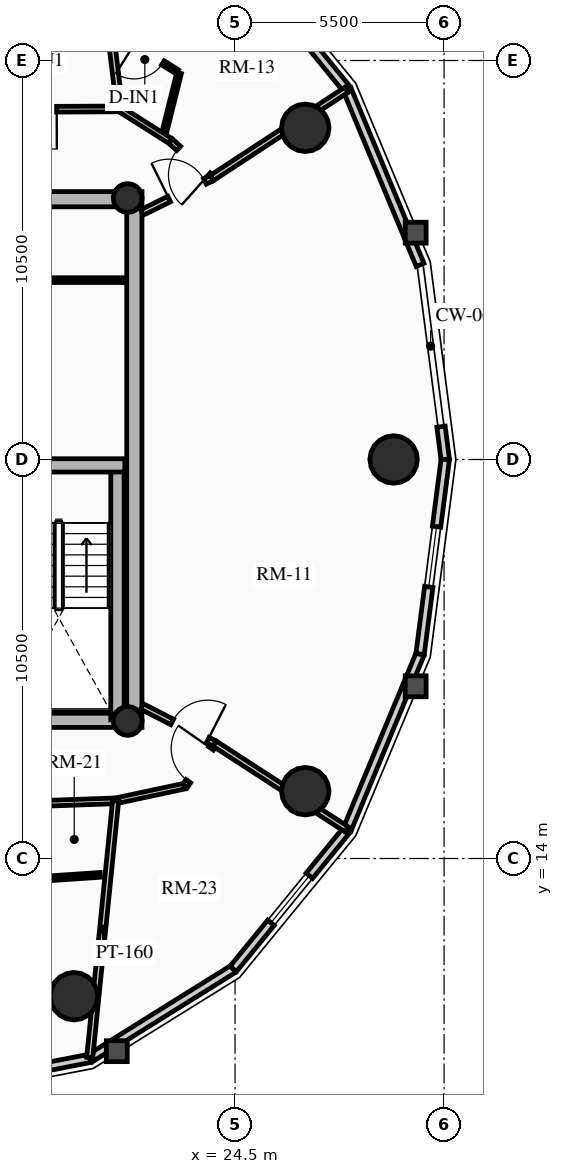
"""IFC4 building model, lengths in metres.
Left out: names, types, materials, properties, quantities, classifications, styles, units other than length and angle.
Written with IfcOpenShell. Run it as: python <this file> out.ifc"""

import sys

from ifc_helpers import new_model, si_unit, direction, frame, frame_2d, origin, origin_2d, place, context, subcontext, project, spatial, rectangle, circle, hollow_circle, extrude, source, transform, mapped, element, fill, save


model = new_model("IFC4")
c1 = context("Model", 3, precision=1e-05, world=origin(), true_north=direction((0.0, 1.0)))
c2 = subcontext(c1, "Body", "Model", "MODEL_VIEW")
j1 = project(units=[si_unit("LENGTHUNIT", "METRE"), si_unit("PLANEANGLEUNIT", "RADIAN")], contexts=[c1])
p1 = place(None, origin())
s1 = spatial("IfcSite", under=j1, at=p1, CompositionType="ELEMENT")
p2 = place(p1, origin())
s2 = spatial("IfcBuilding", under=s1, at=p2, CompositionType="ELEMENT")
p3 = place(p2, frame((0.0, 0.0, 183.61)))
s3 = spatial("IfcBuildingStorey", under=s2, at=p3, CompositionType="ELEMENT", Elevation=183.61)
p4 = place(p3, frame((21.85, 17.45, 0.0), z_axis=(0.0, 0.0, 1.0), x_axis=(0.0, 1.0, 0.0)))
e1 = element("IfcWall", 1, at=p4, inside=s3, PredefinedType="SHEAR", context=c2, shape_type="SweptSolid", body=[
    extrude(rectangle(XDim=14.1, YDim=0.4, at=frame_2d((7.05, 0.0))), origin(), (0.0, 0.0, 1.0), 2.91),
])
p5 = place(p3, frame((11.15, 17.65, 0.0), z_axis=(0.0, 0.0, 1.0), x_axis=(1.0, 0.0, 0.0)))
e2 = element("IfcWall", 2, at=p5, inside=s3, PredefinedType="SHEAR", context=c2, shape_type="SweptSolid", body=[
    extrude(rectangle(XDim=10.7, YDim=0.4, at=frame_2d((5.35, 0.0))), origin(), (0.0, 0.0, 1.0), 2.91),
])
m1 = source(origin(), c2, "Body", "SweptSolid", [
    extrude(rectangle(XDim=1.5, YDim=2.02, at=frame_2d((0.75, 1.01))), frame((0.0, 0.21, 0.0), z_axis=(0.0, -1.0, 0.0), x_axis=(1.0, 0.0, 0.0)), (0.0, 0.0, 1.0), 0.42),
])
p6 = place(p5, frame((5.45, 0.0, 0.0)))
e3 = element("IfcOpeningElement", 3, at=p6, cuts=e2, PredefinedType="OPENING", context=c2, shape_type="MappedRepresentation", body=[
    mapped(m1, transform((0.0, 0.0, 0.0), x_axis=(1.0, 0.0, 0.0), y_axis=(0.0, 1.0, 0.0), z_axis=(0.0, 0.0, 1.0), scale=1.0)),
])
p7 = place(p3, frame((11.15, 31.35, 0.0), z_axis=(0.0, 0.0, 1.0), x_axis=(1.0, 0.0, 0.0)))
e4 = element("IfcWall", 4, at=p7, inside=s3, PredefinedType="SHEAR", context=c2, shape_type="SweptSolid", body=[
    extrude(rectangle(XDim=10.7, YDim=0.4, at=frame_2d((5.35, 0.0))), origin(), (0.0, 0.0, 1.0), 2.91),
])
p8 = place(p7, frame((4.6, 0.0, 0.0)))
e5 = element("IfcOpeningElement", 5, at=p8, cuts=e4, PredefinedType="OPENING", context=c2, shape_type="MappedRepresentation", body=[
    mapped(m1, transform((0.0, 0.0, 0.0), x_axis=(1.0, 0.0, 0.0), y_axis=(0.0, 1.0, 0.0), z_axis=(0.0, 0.0, 1.0), scale=1.0)),
])
p9 = place(p3, frame((21.405, 17.65, 0.0), z_axis=(0.0, 0.0, 1.0), x_axis=(0.0, 1.0, 0.0)))
e6 = element("IfcWall", 6, at=p9, inside=s3, PredefinedType="SHEAR", context=c2, shape_type="SweptSolid", body=[
    extrude(rectangle(XDim=6.695, YDim=0.35, at=frame_2d((3.348, 0.0))), origin(), (0.0, 0.0, 1.0), 2.91),
])
p10 = place(p3, frame((18.315, 24.345, 0.0), z_axis=(0.0, 0.0, 1.0), x_axis=(1.0, 0.0, 0.0)))
e7 = element("IfcWall", 7, at=p10, inside=s3, PredefinedType="SHEAR", context=c2, shape_type="SweptSolid", body=[
    extrude(rectangle(XDim=3.285, YDim=0.35, at=frame_2d((1.643, 0.0))), origin(), (0.0, 0.0, 1.0), 2.91),
])
for number, where, z_axis, x_axis in (
    (8, (21.675, 17.62, 0.0), (0.0, 0.0, 1.0), (1.0, 0.0, 0.0)),
    (9, (21.675, 31.38, 0.0), (0.0, 0.0, 1.0), (1.0, 0.0, 0.0)),
):
    element("IfcColumn", number, at=place(p3, frame(where, z_axis=z_axis, x_axis=x_axis)), inside=s3, PredefinedType="COLUMN", context=c2, shape_type="SweptSolid", body=[
        extrude(hollow_circle(Radius=0.38, WallThickness=0.032, at=origin_2d()), origin(), (0.0, 0.0, 1.0), 2.91),
    ])
for number, where, z_axis, x_axis in (
    (10, (28.672, 24.5, 0.0), (0.0, 0.0, 1.0), (1.0, 0.0, 0.0)),
    (11, (26.347, 33.229, 0.0), (0.0, 0.0, 1.0), (1.0, 0.0, 0.0)),
    (12, (20.261, 10.377, 0.0), (0.0, 0.0, 1.0), (1.0, 0.0, 0.0)),
    (13, (26.347, 15.771, 0.0), (0.0, 0.0, 1.0), (1.0, 0.0, 0.0)),
):
    element("IfcColumn", number, at=place(p3, frame(where, z_axis=z_axis, x_axis=x_axis)), inside=s3, PredefinedType="USERDEFINED", context=c2, shape_type="SweptSolid", body=[
        extrude(circle(Radius=0.625, at=origin_2d()), origin(), (0.0, 0.0, 1.0), 2.91),
    ])
p11 = place(p3, frame((29.919, 25.363, 0.0), z_axis=(0.0, 0.0, 1.0), x_axis=(0.128247365719, -0.991742211054, 0.0)))
e14 = element("IfcWall", 14, at=p11, inside=s3, PredefinedType="SOLIDWALL", context=c2, shape_type="SweptSolid", body=[
    extrude(rectangle(XDim=0.87, YDim=0.22, at=frame_2d((0.435, 0.0))), origin(), (0.0, 0.0, 1.0), 2.675),
])
p12 = place(p3, frame((27.447, 34.24, 0.0), z_axis=(0.0, 0.0, 1.0), x_axis=(0.384144094086, -0.923273152961, 0.0)))
e15 = element("IfcWall", 15, at=p12, inside=s3, PredefinedType="SOLIDWALL", context=c2, shape_type="SweptSolid", body=[
    extrude(rectangle(XDim=5.003, YDim=0.22, at=frame_2d((2.501, 0.0))), origin(), (0.0, 0.0, 1.0), 2.245),
])
p13 = place(p3, frame((24.453, 37.906, 0.0), z_axis=(0.0, 0.0, 1.0), x_axis=(0.632470615287, -0.774584353572, 0.0)))
e16 = element("IfcWall", 16, at=p13, inside=s3, PredefinedType="SOLIDWALL", context=c2, shape_type="SweptSolid", body=[
    extrude(rectangle(XDim=4.733, YDim=0.22, at=frame_2d((2.366, 0.0))), origin(), (0.0, 0.0, 1.0), 2.245),
])
m2 = source(origin(), c2, "Body", "SweptSolid", [
    extrude(rectangle(XDim=1.6, YDim=1.3, at=frame_2d((0.8, 0.65))), frame((0.0, 0.12, 0.0), z_axis=(0.0, -1.0, 0.0), x_axis=(1.0, 0.0, 0.0)), (0.0, 0.0, 1.0), 0.24),
])
p14 = place(p13, frame((1.566, 0.0, 0.65)))
e17 = element("IfcOpeningElement", 17, at=p14, cuts=e16, PredefinedType="OPENING", context=c2, shape_type="MappedRepresentation", body=[
    mapped(m2, transform((0.0, 0.0, 0.0), x_axis=(1.0, 0.0, 0.0), y_axis=(0.0, 1.0, 0.0), z_axis=(0.0, 0.0, 1.0), scale=1.0)),
])
p15 = place(p3, frame((20.681, 8.741, 0.0), z_axis=(0.0, 0.0, 1.0), x_axis=(-0.981703883443, -0.190413983815, 0.0)))
e18 = element("IfcWall", 18, at=p15, inside=s3, PredefinedType="SOLIDWALL", context=c2, shape_type="SweptSolid", body=[
    extrude(rectangle(XDim=4.259, YDim=0.22, at=frame_2d((2.13, 0.0))), origin(), (0.0, 0.0, 1.0), 2.245),
])
p16 = place(p15, frame((1.33, 0.0, 0.65)))
e19 = element("IfcOpeningElement", 19, at=p16, cuts=e18, PredefinedType="OPENING", context=c2, shape_type="MappedRepresentation", body=[
    mapped(m2, transform((0.0, 0.0, 0.0), x_axis=(1.0, 0.0, 0.0), y_axis=(0.0, 1.0, 0.0), z_axis=(0.0, 0.0, 1.0), scale=1.0)),
])
p17 = place(p3, frame((24.453, 11.094, 0.0), z_axis=(0.0, 0.0, 1.0), x_axis=(-0.848399108042, -0.529357113368, 0.0)))
e20 = element("IfcWall", 20, at=p17, inside=s3, PredefinedType="SOLIDWALL", context=c2, shape_type="SweptSolid", body=[
    extrude(rectangle(XDim=4.446, YDim=0.22, at=frame_2d((2.223, 0.0))), origin(), (0.0, 0.0, 1.0), 2.245),
])
p18 = place(p3, frame((27.447, 14.76, 0.0), z_axis=(0.0, 0.0, 1.0), x_axis=(-0.632470615287, -0.774584353572, 0.0)))
e21 = element("IfcWall", 21, at=p18, inside=s3, PredefinedType="SOLIDWALL", context=c2, shape_type="SweptSolid", body=[
    extrude(rectangle(XDim=4.733, YDim=0.22, at=frame_2d((2.366, 0.0))), origin(), (0.0, 0.0, 1.0), 2.245),
])
p19 = place(p18, frame((1.566, 0.0, 0.65)))
e22 = element("IfcOpeningElement", 22, at=p19, cuts=e21, PredefinedType="OPENING", context=c2, shape_type="MappedRepresentation", body=[
    mapped(m2, transform((0.0, 0.0, 0.0), x_axis=(1.0, 0.0, 0.0), y_axis=(0.0, 1.0, 0.0), z_axis=(0.0, 0.0, 1.0), scale=1.0)),
])
p20 = place(p3, frame((29.369, 19.38, 0.0), z_axis=(0.0, 0.0, 1.0), x_axis=(-0.384144094086, -0.923273152961, 0.0)))
e23 = element("IfcWall", 23, at=p20, inside=s3, PredefinedType="SOLIDWALL", context=c2, shape_type="SweptSolid", body=[
    extrude(rectangle(XDim=5.003, YDim=0.22, at=frame_2d((2.501, 0.0))), origin(), (0.0, 0.0, 1.0), 2.245),
])
p21 = place(p3, frame((30.031, 24.5, 0.0), z_axis=(0.0, 0.0, 1.0), x_axis=(-0.128287912609, -0.991736966881, 0.0)))
e24 = element("IfcWall", 24, at=p21, inside=s3, PredefinedType="SOLIDWALL", context=c2, shape_type="SweptSolid", body=[
    extrude(rectangle(XDim=5.163, YDim=0.22, at=frame_2d((2.582, 0.0))), origin(), (0.0, 0.0, 1.0), 2.245),
])
p22 = place(p21, frame((1.782, 0.0, 0.65)))
e25 = element("IfcOpeningElement", 25, at=p22, cuts=e24, PredefinedType="OPENING", context=c2, shape_type="MappedRepresentation", body=[
    mapped(m2, transform((0.0, 0.0, 0.0), x_axis=(1.0, 0.0, 0.0), y_axis=(0.0, 1.0, 0.0), z_axis=(0.0, 0.0, 1.0), scale=1.0)),
])
p23 = place(p3, frame((18.38, 29.22, 0.0), z_axis=(0.0, 0.0, 1.0), x_axis=(1.0, 0.0, 0.0)))
e26 = element("IfcWall", 26, at=p23, inside=s3, PredefinedType="PARTITIONING", context=c2, shape_type="SweptSolid", body=[
    extrude(rectangle(XDim=3.22, YDim=0.125, at=frame_2d((1.61, 0.0))), origin(), (0.0, 0.0, 1.0), 2.212),
])
p24 = place(p3, frame((23.887, 31.906, 0.0), z_axis=(0.0, 0.0, 1.0), x_axis=(-0.744900957214, 0.66717506244, 0.0)))
e27 = element("IfcWall", 27, at=p24, inside=s3, PredefinedType="PARTITIONING", context=c2, shape_type="SweptSolid", body=[
    extrude(rectangle(XDim=1.464, YDim=0.15, at=frame_2d((0.732, 0.0))), origin(), (0.0, 0.0, 1.0), 2.245),
])
m3 = source(origin(), c2, "Body", "SweptSolid", [
    extrude(rectangle(XDim=1.05, YDim=2.015, at=frame_2d((0.525, 1.007))), frame((0.0, 0.085, 0.0), z_axis=(0.0, -1.0, 0.0), x_axis=(1.0, 0.0, 0.0)), (0.0, 0.0, 1.0), 0.17),
])
p25 = place(p24, frame((0.12, 0.0, 0.0)))
e28 = element("IfcOpeningElement", 28, at=p25, cuts=e27, PredefinedType="OPENING", context=c2, shape_type="MappedRepresentation", body=[
    mapped(m3, transform((0.0, 0.0, 0.0), x_axis=(1.0, 0.0, 0.0), y_axis=(0.0, 1.0, 0.0), z_axis=(0.0, 0.0, 1.0), scale=1.0)),
])
p26 = place(p3, frame((22.797, 32.883, 0.0), z_axis=(0.0, 0.0, 1.0), x_axis=(-0.84484009232, 0.535018895375, 0.0)))
e29 = element("IfcWall", 29, at=p26, inside=s3, PredefinedType="PARTITIONING", context=c2, shape_type="SweptSolid", body=[
    extrude(rectangle(XDim=1.575, YDim=0.15, at=frame_2d((0.788, 0.0))), origin(), (0.0, 0.0, 1.0), 2.245),
])
p27 = place(p3, frame((21.466, 33.726, 0.0), z_axis=(0.0, 0.0, 1.0), x_axis=(-0.99998838579, -0.004819573058, 0.0)))
e30 = element("IfcWall", 30, at=p27, inside=s3, PredefinedType="PARTITIONING", context=c2, shape_type="SweptSolid", body=[
    extrude(rectangle(XDim=3.343, YDim=0.15, at=frame_2d((1.672, 0.0))), origin(), (0.0, 0.0, 1.0), 2.245),
])
p28 = place(p27, frame((1.66, 0.0, 0.0)))
e31 = element("IfcOpeningElement", 31, at=p28, cuts=e30, PredefinedType="OPENING", context=c2, shape_type="MappedRepresentation", body=[
    mapped(m3, transform((0.0, 0.0, 0.0), x_axis=(1.0, 0.0, 0.0), y_axis=(0.0, 1.0, 0.0), z_axis=(0.0, 0.0, 1.0), scale=1.0)),
])
p29 = place(p3, frame((14.802, 15.291, 0.0), z_axis=(0.0, 0.0, 1.0), x_axis=(0.999405778293, 0.034468686011, 0.0)))
e32 = element("IfcWall", 32, at=p29, inside=s3, PredefinedType="PARTITIONING", context=c2, shape_type="SweptSolid", body=[
    extrude(rectangle(XDim=6.559, YDim=0.15, at=frame_2d((3.279, 0.0))), origin(), (0.0, 0.0, 1.0), 2.245),
])
p30 = place(p3, frame((21.357, 15.517, 0.0), z_axis=(0.0, 0.0, 1.0), x_axis=(0.977773676035, 0.209663154733, 0.0)))
e33 = element("IfcWall", 33, at=p30, inside=s3, PredefinedType="PARTITIONING", context=c2, shape_type="SweptSolid", body=[
    extrude(rectangle(XDim=1.865, YDim=0.15, at=frame_2d((0.933, 0.0))), origin(), (0.0, 0.0, 1.0), 2.245),
])
p31 = place(p3, frame((23.181, 15.908, 0.0), z_axis=(0.0, 0.0, 1.0), x_axis=(0.571342842249, 0.820711494138, 0.0)))
e34 = element("IfcWall", 34, at=p31, inside=s3, PredefinedType="PARTITIONING", context=c2, shape_type="SweptSolid", body=[
    extrude(rectangle(XDim=1.362, YDim=0.15, at=frame_2d((0.681, 0.0))), origin(), (0.0, 0.0, 1.0), 2.245),
])
p32 = place(p31, frame((0.156, 0.0, 0.0)))
e35 = element("IfcOpeningElement", 35, at=p32, cuts=e34, PredefinedType="OPENING", context=c2, shape_type="MappedRepresentation", body=[
    mapped(m3, transform((0.0, 0.0, 0.0), x_axis=(1.0, 0.0, 0.0), y_axis=(0.0, 1.0, 0.0), z_axis=(0.0, 0.0, 1.0), scale=1.0)),
])
p33 = place(p3, frame((23.887, 31.906, 0.0), z_axis=(0.0, 0.0, 1.0), x_axis=(0.836482991446, 0.547992887748, 0.0)))
e36 = element("IfcWall", 36, at=p33, inside=s3, PredefinedType="PARTITIONING", context=c2, shape_type="SweptSolid", body=[
    extrude(rectangle(XDim=4.236, YDim=0.16, at=frame_2d((2.118, 0.0))), origin(), (0.0, 0.0, 1.0), 2.245),
])
p34 = place(p3, frame((21.466, 33.726, 0.0), z_axis=(0.0, 0.0, 1.0), x_axis=(-0.12050358126, 0.992712892484, 0.0)))
e37 = element("IfcWall", 37, at=p34, inside=s3, PredefinedType="PARTITIONING", context=c2, shape_type="SweptSolid", body=[
    extrude(rectangle(XDim=6.562, YDim=0.16, at=frame_2d((3.281, 0.0))), origin(), (0.0, 0.0, 1.0), 2.245),
])
p35 = place(p3, frame((21.357, 15.517, 0.0), z_axis=(0.0, 0.0, 1.0), x_axis=(-0.100446941693, -0.994942416376, 0.0)))
e38 = element("IfcWall", 38, at=p35, inside=s3, PredefinedType="PARTITIONING", context=c2, shape_type="SweptSolid", body=[
    extrude(rectangle(XDim=6.791, YDim=0.16, at=frame_2d((3.396, 0.0))), origin(), (0.0, 0.0, 1.0), 2.245),
])
p36 = place(p3, frame((23.959, 17.025, 0.0), z_axis=(0.0, 0.0, 1.0), x_axis=(0.838803293388, -0.544434601215, 0.0)))
e39 = element("IfcWall", 39, at=p36, inside=s3, PredefinedType="PARTITIONING", context=c2, shape_type="SweptSolid", body=[
    extrude(rectangle(XDim=4.139, YDim=0.16, at=frame_2d((2.069, 0.0))), origin(), (0.0, 0.0, 1.0), 2.245),
])
p37 = place(p3, frame((22.05, 31.0, 0.0), z_axis=(0.0, 0.0, 1.0), x_axis=(0.896798317999, 0.442439574218, 0.0)))
e40 = element("IfcWall", 40, at=p37, inside=s3, PredefinedType="PARTITIONING", context=c2, shape_type="SweptSolid", body=[
    extrude(rectangle(XDim=2.048, YDim=0.16, at=frame_2d((1.024, 0.0))), origin(), (0.0, 0.0, 1.0), 2.245),
])
m4 = source(origin(), c2, "Body", "SweptSolid", [
    extrude(rectangle(XDim=1.05, YDim=2.015, at=frame_2d((0.525, 1.007))), frame((0.0, 0.09, 0.0), z_axis=(0.0, -1.0, 0.0), x_axis=(1.0, 0.0, 0.0)), (0.0, 0.0, 1.0), 0.18),
])
p38 = place(p37, frame((0.798, 0.0, 0.0)))
e41 = element("IfcOpeningElement", 41, at=p38, cuts=e40, PredefinedType="OPENING", context=c2, shape_type="MappedRepresentation", body=[
    mapped(m4, transform((0.0, 0.0, 0.0), x_axis=(1.0, 0.0, 0.0), y_axis=(0.0, 1.0, 0.0), z_axis=(0.0, 0.0, 1.0), scale=1.0)),
])
p39 = place(p3, frame((22.05, 18.0, 0.0), z_axis=(0.0, 0.0, 1.0), x_axis=(0.890660222535, -0.454669515136, 0.0)))
e42 = element("IfcWall", 42, at=p39, inside=s3, PredefinedType="PARTITIONING", context=c2, shape_type="SweptSolid", body=[
    extrude(rectangle(XDim=2.144, YDim=0.16, at=frame_2d((1.072, 0.0))), origin(), (0.0, 0.0, 1.0), 2.245),
])
p40 = place(p39, frame((0.894, 0.0, 0.0)))
e43 = element("IfcOpeningElement", 43, at=p40, cuts=e42, PredefinedType="OPENING", context=c2, shape_type="MappedRepresentation", body=[
    mapped(m4, transform((0.0, 0.0, 0.0), x_axis=(1.0, 0.0, 0.0), y_axis=(0.0, 1.0, 0.0), z_axis=(0.0, 0.0, 1.0), scale=1.0)),
])
p41 = place(p3, frame((22.649, 33.157, 0.0), z_axis=(0.0, 0.0, 1.0), x_axis=(0.242461964074, 0.970160912415, 0.0)))
e44 = element("IfcWall", 44, at=p41, inside=s3, PredefinedType="PARTITIONING", context=c2, shape_type="SweptSolid", body=[
    extrude(rectangle(XDim=1.56, YDim=0.125, at=frame_2d((0.78, 0.0))), origin(), (0.0, 0.0, 1.0), 2.245),
])
p42 = place(p3, frame((22.975, 34.704, 0.0), z_axis=(0.0, 0.0, 1.0), x_axis=(-0.84683355027, 0.531858005615, 0.0)))
e45 = element("IfcWall", 45, at=p42, inside=s3, PredefinedType="PARTITIONING", context=c2, shape_type="SweptSolid", body=[
    extrude(rectangle(XDim=1.994, YDim=0.125, at=frame_2d((0.997, 0.0))), origin(), (0.0, 0.0, 1.0), 2.675),
])
m5 = source(origin(), c2, "Body", "SweptSolid", [
    extrude(rectangle(XDim=0.9, YDim=2.005, at=frame_2d((0.45, 1.002))), frame((0.0, 0.073, 0.0), z_axis=(0.0, -1.0, 0.0), x_axis=(1.0, 0.0, 0.0)), (0.0, 0.0, 1.0), 0.145),
])
p43 = place(p42, frame((0.44, 0.0, 0.0)))
e46 = element("IfcOpeningElement", 46, at=p43, cuts=e45, PredefinedType="OPENING", context=c2, shape_type="MappedRepresentation", body=[
    mapped(m5, transform((0.0, 0.0, 0.0), x_axis=(1.0, 0.0, 0.0), y_axis=(0.0, 1.0, 0.0), z_axis=(0.0, 0.0, 1.0), scale=1.0)),
])
p44 = place(p3, frame((18.137, 13.38, 0.0), z_axis=(0.0, 0.0, 1.0), x_axis=(0.997767152953, 0.066788535611, 0.0)))
e47 = element("IfcWall", 47, at=p44, inside=s3, PredefinedType="PARTITIONING", context=c2, shape_type="SweptSolid", body=[
    extrude(rectangle(XDim=2.826, YDim=0.125, at=frame_2d((1.413, 0.0))), origin(), (0.0, 0.0, 1.0), 2.245),
])
p45 = place(p44, frame((0.12, 0.0, 0.0)))
e48 = element("IfcOpeningElement", 48, at=p45, cuts=e47, PredefinedType="OPENING", context=c2, shape_type="MappedRepresentation", body=[
    mapped(m5, transform((0.0, 0.0, 0.0), x_axis=(1.0, 0.0, 0.0), y_axis=(0.0, 1.0, 0.0), z_axis=(0.0, 0.0, 1.0), scale=1.0)),
])
m6 = source(origin(), c2, "Body", "SweptSolid", [
    extrude(rectangle(XDim=1.6, YDim=1.3, at=frame_2d((0.8, 0.65))), frame((0.0, 0.03, 0.0), z_axis=(0.0, -1.0, 0.0), x_axis=(1.0, 0.0, 0.0)), (0.0, 0.0, 1.0), 0.06),
])
p46 = place(p19, origin())
e49 = element("IfcWindow", 49, at=p46, inside=s3, PartitioningType="SINGLE_PANEL", PredefinedType="WINDOW", context=c2, shape_type="MappedRepresentation", body=[
    mapped(m6, transform((0.0, 0.0, 0.0), x_axis=(1.0, 0.0, 0.0), y_axis=(0.0, 1.0, 0.0), z_axis=(0.0, 0.0, 1.0), scale=1.0)),
])
fill(e22, e49)
p47 = place(p22, origin())
e50 = element("IfcWindow", 50, at=p47, inside=s3, PartitioningType="SINGLE_PANEL", PredefinedType="WINDOW", context=c2, shape_type="MappedRepresentation", body=[
    mapped(m6, transform((0.0, 0.0, 0.0), x_axis=(1.0, 0.0, 0.0), y_axis=(0.0, 1.0, 0.0), z_axis=(0.0, 0.0, 1.0), scale=1.0)),
])
fill(e25, e50)
m7 = source(origin(), c2, "Body", "SweptSolid", [
    extrude(rectangle(XDim=1.05, YDim=2.015, at=frame_2d((0.525, 1.007))), frame((0.0, 0.025, 0.0), z_axis=(0.0, -1.0, 0.0), x_axis=(1.0, 0.0, 0.0)), (0.0, 0.0, 1.0), 0.05),
])
p48 = place(p38, origin())
e51 = element("IfcDoor", 51, at=p48, inside=s3, OperationType="SINGLE_SWING_LEFT", PredefinedType="DOOR", context=c2, shape_type="MappedRepresentation", body=[
    mapped(m7, transform((0.0, 0.0, 0.0), x_axis=(1.0, 0.0, 0.0), y_axis=(0.0, 1.0, 0.0), z_axis=(0.0, 0.0, 1.0), scale=1.0)),
])
fill(e41, e51)
p49 = place(p40, origin())
e52 = element("IfcDoor", 52, at=p49, inside=s3, OperationType="SINGLE_SWING_RIGHT", PredefinedType="DOOR", context=c2, shape_type="MappedRepresentation", body=[
    mapped(m7, transform((0.0, 0.0, 0.0), x_axis=(1.0, 0.0, 0.0), y_axis=(0.0, 1.0, 0.0), z_axis=(0.0, 0.0, 1.0), scale=1.0)),
])
fill(e43, e52)
p50 = place(p25, origin())
e53 = element("IfcDoor", 53, at=p50, inside=s3, OperationType="SINGLE_SWING_LEFT", PredefinedType="DOOR", context=c2, shape_type="MappedRepresentation", body=[
    mapped(m7, transform((0.0, 0.0, 0.0), x_axis=(1.0, 0.0, 0.0), y_axis=(0.0, 1.0, 0.0), z_axis=(0.0, 0.0, 1.0), scale=1.0)),
])
fill(e28, e53)
m8 = source(origin(), c2, "Body", "SweptSolid", [
    extrude(rectangle(XDim=0.9, YDim=2.005, at=frame_2d((0.45, 1.002))), frame((0.0, 0.025, 0.0), z_axis=(0.0, -1.0, 0.0), x_axis=(1.0, 0.0, 0.0)), (0.0, 0.0, 1.0), 0.05),
])
p51 = place(p43, origin())
e54 = element("IfcDoor", 54, at=p51, inside=s3, OperationType="SINGLE_SWING_RIGHT", PredefinedType="DOOR", context=c2, shape_type="MappedRepresentation", body=[
    mapped(m8, transform((0.0, 0.0, 0.0), x_axis=(1.0, 0.0, 0.0), y_axis=(0.0, 1.0, 0.0), z_axis=(0.0, 0.0, 1.0), scale=1.0)),
])
fill(e46, e54)
p52 = place(p28, origin())
e55 = element("IfcDoor", 55, at=p52, inside=s3, OperationType="SINGLE_SWING_LEFT", PredefinedType="DOOR", context=c2, shape_type="MappedRepresentation", body=[
    mapped(m7, transform((0.0, 0.0, 0.0), x_axis=(1.0, 0.0, 0.0), y_axis=(0.0, 1.0, 0.0), z_axis=(0.0, 0.0, 1.0), scale=1.0)),
])
fill(e31, e55)
p53 = place(p32, origin())
e56 = element("IfcDoor", 56, at=p53, inside=s3, OperationType="SINGLE_SWING_RIGHT", PredefinedType="DOOR", context=c2, shape_type="MappedRepresentation", body=[
    mapped(m7, transform((0.0, 0.0, 0.0), x_axis=(1.0, 0.0, 0.0), y_axis=(0.0, 1.0, 0.0), z_axis=(0.0, 0.0, 1.0), scale=1.0)),
])
fill(e35, e56)
save(model, sys.argv[1])
